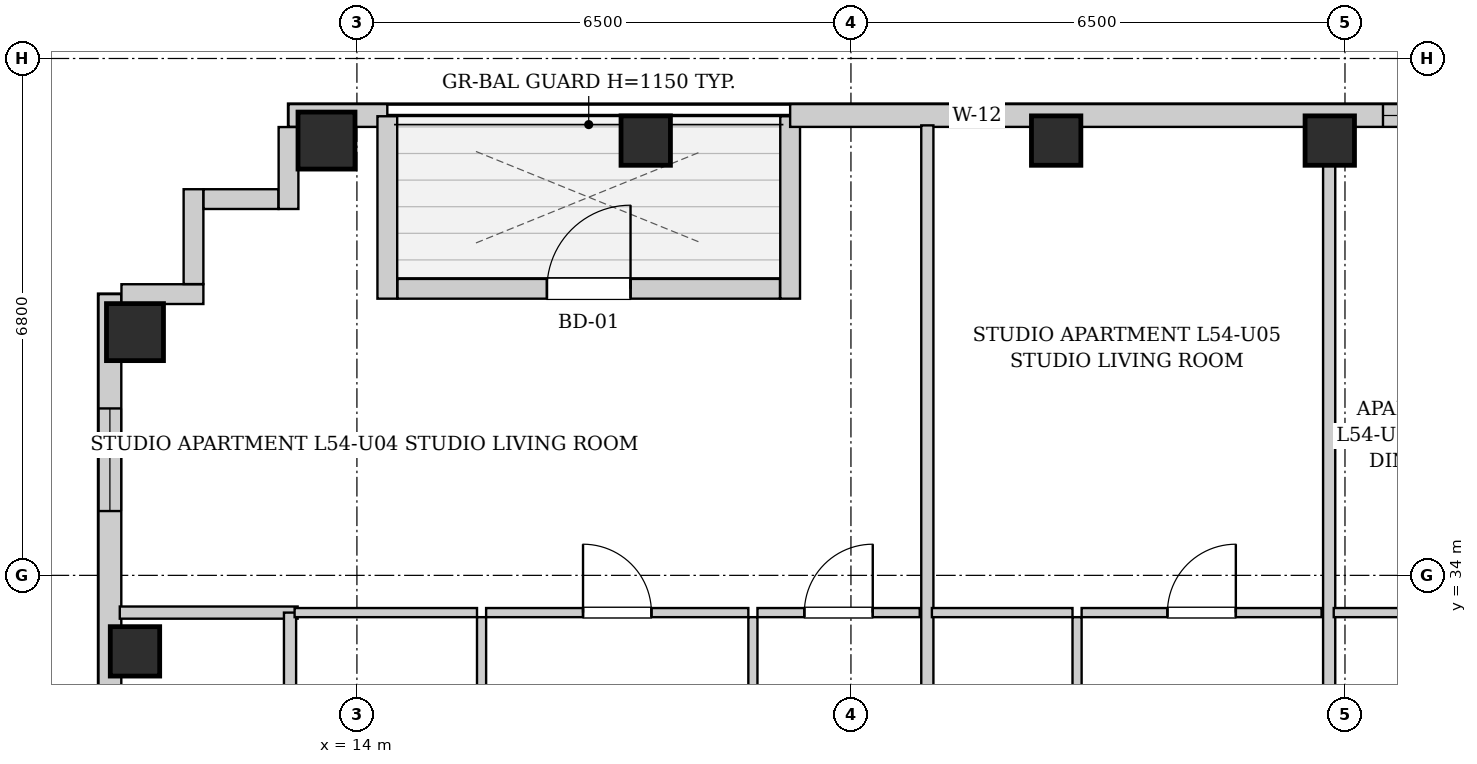
"""IFC4 building model, lengths in metres.
Left out: names, types, materials, properties, quantities, classifications, styles, units other than length and angle.
Written with IfcOpenShell. Run it as: python <this file> out.ifc"""

import sys

from ifc_helpers import new_model, si_unit, direction, frame, frame_2d, origin, origin_2d, place, context, subcontext, project, spatial, rectangle, extrude, element, fill, save


model = new_model("IFC4")
c1 = context("Model", 3, precision=1e-05, world=origin(), true_north=direction((0.0, 1.0)))
c2 = subcontext(c1, "Body", "Model", "MODEL_VIEW")
j1 = project(units=[si_unit("LENGTHUNIT", "METRE"), si_unit("PLANEANGLEUNIT", "RADIAN")], contexts=[c1])
p1 = place(None, origin())
s1 = spatial("IfcSite", under=j1, at=p1, CompositionType="ELEMENT")
p2 = place(p1, origin())
s2 = spatial("IfcBuilding", under=s1, at=p2, CompositionType="ELEMENT")
p3 = place(p2, frame((0.0, 0.0, 187.6)))
s3 = spatial("IfcBuildingStorey", under=s2, at=p3, CompositionType="ELEMENT", Elevation=187.6)
p4 = place(p3, frame((13.6, 39.72, 0.0), z_axis=(0.0, 0.0, 1.0), x_axis=(1.0, 0.0, 0.0)))
e1 = element("IfcColumn", 1, at=p4, inside=s3, PredefinedType="COLUMN", context=c2, shape_type="SweptSolid", body=[
    extrude(rectangle(XDim=0.75, YDim=0.75, at=origin_2d()), origin(), (0.0, 0.0, 1.0), 3.3),
])
for number, where, z_axis, x_axis in (
    (2, (17.8, 39.72, 0.0), (0.0, 0.0, 1.0), (1.0, 0.0, 0.0)),
    (3, (23.2, 39.72, 0.0), (0.0, 0.0, 1.0), (1.0, 0.0, 0.0)),
    (4, (26.8, 39.72, 0.0), (0.0, 0.0, 1.0), (1.0, 0.0, 0.0)),
    (5, (11.08, 33.0, 0.0), (0.0, 0.0, 1.0), (1.0, 0.0, 0.0)),
):
    element("IfcColumn", number, at=place(p3, frame(where, z_axis=z_axis, x_axis=x_axis)), inside=s3, PredefinedType="COLUMN", context=c2, shape_type="SweptSolid", body=[
        extrude(rectangle(XDim=0.65, YDim=0.65, at=origin_2d()), origin(), (0.0, 0.0, 1.0), 3.3),
    ])
p5 = place(p3, frame((11.08, 37.2, 0.0), z_axis=(0.0, 0.0, 1.0), x_axis=(1.0, 0.0, 0.0)))
e6 = element("IfcColumn", 6, at=p5, inside=s3, PredefinedType="COLUMN", context=c2, shape_type="SweptSolid", body=[
    extrude(rectangle(XDim=0.75, YDim=0.75, at=origin_2d()), origin(), (0.0, 0.0, 1.0), 3.3),
])
p6 = place(p3, frame((13.1, 40.05, 0.0), z_axis=(0.0, 0.0, 1.0), x_axis=(1.0, 0.0, 0.0)))
e7 = element("IfcWall", 7, at=p6, inside=s3, PredefinedType="SOLIDWALL", context=c2, shape_type="SweptSolid", body=[
    extrude(rectangle(XDim=1.3, YDim=0.3, at=frame_2d((0.65, 0.0))), origin(), (0.0, 0.0, 1.0), 3.04),
])
p7 = place(p3, frame((14.4, 40.04, 0.0), z_axis=(0.0, 0.0, 1.0), x_axis=(0.0, -1.0, 0.0)))
e8 = element("IfcWall", 8, at=p7, inside=s3, PredefinedType="SOLIDWALL", context=c2, shape_type="SweptSolid", body=[
    extrude(rectangle(XDim=2.4, YDim=0.26, at=frame_2d((1.2, 0.0))), origin(), (0.0, 0.0, 1.0), 3.04),
])
p8 = place(p3, frame((14.534, 37.77, 0.0), z_axis=(0.0, 0.0, 1.0), x_axis=(1.0, 0.0, 0.0)))
e9 = element("IfcWall", 9, at=p8, inside=s3, PredefinedType="SOLIDWALL", context=c2, shape_type="SweptSolid", body=[
    extrude(rectangle(XDim=5.032, YDim=0.26, at=frame_2d((2.516, 0.0))), origin(), (0.0, 0.0, 1.0), 3.04),
])
p9 = place(p8, frame((1.966, 0.0, 0.0)))
e10 = element("IfcOpeningElement", 10, at=p9, cuts=e9, PredefinedType="OPENING", context=c2, shape_type="SweptSolid", body=[
    extrude(rectangle(XDim=1.1, YDim=2.0, at=frame_2d((0.55, 1.0))), frame((0.0, 0.14, 0.0), z_axis=(0.0, -1.0, 0.0), x_axis=(1.0, 0.0, 0.0)), (0.0, 0.0, 1.0), 0.28),
])
p10 = place(p3, frame((19.7, 37.64, 0.0), z_axis=(0.0, 0.0, 1.0), x_axis=(0.0, 1.0, 0.0)))
e11 = element("IfcWall", 11, at=p10, inside=s3, PredefinedType="SOLIDWALL", context=c2, shape_type="SweptSolid", body=[
    extrude(rectangle(XDim=2.4, YDim=0.26, at=frame_2d((1.2, 0.0))), origin(), (0.0, 0.0, 1.0), 3.04),
])
p11 = place(p3, frame((19.7, 40.05, 0.0), z_axis=(0.0, 0.0, 1.0), x_axis=(1.0, 0.0, 0.0)))
e12 = element("IfcWall", 12, at=p11, inside=s3, PredefinedType="SOLIDWALL", context=c2, shape_type="SweptSolid", body=[
    extrude(rectangle(XDim=9.7, YDim=0.3, at=frame_2d((4.85, 0.0))), origin(), (0.0, 0.0, 1.0), 3.04),
])
p12 = place(p11, frame((2.12, 0.0, 0.55)))
e13 = element("IfcOpeningElement", 13, at=p12, cuts=e12, PredefinedType="OPENING", context=c2, shape_type="SweptSolid", body=[
    extrude(rectangle(XDim=0.68, YDim=1.2, at=frame_2d((0.34, 0.6))), frame((0.0, 0.16, 0.0), z_axis=(0.0, -1.0, 0.0), x_axis=(1.0, 0.0, 0.0)), (0.0, 0.0, 1.0), 0.32),
])
p13 = place(p11, frame((7.8, 0.0, 0.55)))
e14 = element("IfcOpeningElement", 14, at=p13, cuts=e12, PredefinedType="OPENING", context=c2, shape_type="SweptSolid", body=[
    extrude(rectangle(XDim=1.35, YDim=1.2, at=frame_2d((0.675, 0.6))), frame((0.0, 0.16, 0.0), z_axis=(0.0, -1.0, 0.0), x_axis=(1.0, 0.0, 0.0)), (0.0, 0.0, 1.0), 0.32),
])
p14 = place(p3, frame((10.75, 6.3, 0.0), z_axis=(0.0, 0.0, 1.0), x_axis=(0.0, 1.0, 0.0)))
e15 = element("IfcWall", 15, at=p14, inside=s3, PredefinedType="SOLIDWALL", context=c2, shape_type="SweptSolid", body=[
    extrude(rectangle(XDim=31.4, YDim=0.3, at=frame_2d((15.7, 0.0))), origin(), (0.0, 0.0, 1.0), 3.04),
])
p15 = place(p14, frame((1.504, 0.0, 0.55)))
e16 = element("IfcOpeningElement", 16, at=p15, cuts=e15, PredefinedType="OPENING", context=c2, shape_type="SweptSolid", body=[
    extrude(rectangle(XDim=1.35, YDim=1.2, at=frame_2d((0.675, 0.6))), frame((0.0, 0.16, 0.0), z_axis=(0.0, -1.0, 0.0), x_axis=(1.0, 0.0, 0.0)), (0.0, 0.0, 1.0), 0.32),
])
p16 = place(p14, frame((28.546, 0.0, 0.55)))
e17 = element("IfcOpeningElement", 17, at=p16, cuts=e15, PredefinedType="OPENING", context=c2, shape_type="SweptSolid", body=[
    extrude(rectangle(XDim=1.35, YDim=1.2, at=frame_2d((0.675, 0.6))), frame((0.0, 0.16, 0.0), z_axis=(0.0, -1.0, 0.0), x_axis=(1.0, 0.0, 0.0)), (0.0, 0.0, 1.0), 0.32),
])
p17 = place(p14, frame((11.85, 0.0, 0.55)))
e18 = element("IfcOpeningElement", 18, at=p17, cuts=e15, PredefinedType="OPENING", context=c2, shape_type="SweptSolid", body=[
    extrude(rectangle(XDim=1.35, YDim=1.2, at=frame_2d((0.675, 0.6))), frame((0.0, 0.16, 0.0), z_axis=(0.0, -1.0, 0.0), x_axis=(1.0, 0.0, 0.0)), (0.0, 0.0, 1.0), 0.32),
])
p18 = place(p14, frame((9.185, 0.0, 0.55)))
e19 = element("IfcOpeningElement", 19, at=p18, cuts=e15, PredefinedType="OPENING", context=c2, shape_type="SweptSolid", body=[
    extrude(rectangle(XDim=1.35, YDim=1.2, at=frame_2d((0.675, 0.6))), frame((0.0, 0.16, 0.0), z_axis=(0.0, -1.0, 0.0), x_axis=(1.0, 0.0, 0.0)), (0.0, 0.0, 1.0), 0.32),
])
p19 = place(p14, frame((19.006, 0.0, 0.55)))
e20 = element("IfcOpeningElement", 20, at=p19, cuts=e15, PredefinedType="OPENING", context=c2, shape_type="SweptSolid", body=[
    extrude(rectangle(XDim=1.35, YDim=1.2, at=frame_2d((0.675, 0.6))), frame((0.0, 0.16, 0.0), z_axis=(0.0, -1.0, 0.0), x_axis=(1.0, 0.0, 0.0)), (0.0, 0.0, 1.0), 0.32),
])
p20 = place(p14, frame((20.616, 0.0, 0.55)))
e21 = element("IfcOpeningElement", 21, at=p20, cuts=e15, PredefinedType="OPENING", context=c2, shape_type="SweptSolid", body=[
    extrude(rectangle(XDim=1.35, YDim=1.2, at=frame_2d((0.675, 0.6))), frame((0.0, 0.16, 0.0), z_axis=(0.0, -1.0, 0.0), x_axis=(1.0, 0.0, 0.0)), (0.0, 0.0, 1.0), 0.32),
])
p21 = place(p3, frame((10.902, 37.7, 0.0), z_axis=(0.0, 0.0, 1.0), x_axis=(1.0, 0.0, 0.0)))
e22 = element("IfcWall", 22, at=p21, inside=s3, PredefinedType="SOLIDWALL", context=c2, shape_type="SweptSolid", body=[
    extrude(rectangle(XDim=1.078, YDim=0.26, at=frame_2d((0.539, 0.0))), origin(), (0.0, 0.0, 1.0), 3.04),
])
p22 = place(p3, frame((11.85, 37.832, 0.0), z_axis=(0.0, 0.0, 1.0), x_axis=(0.0, 1.0, 0.0)))
e23 = element("IfcWall", 23, at=p22, inside=s3, PredefinedType="SOLIDWALL", context=c2, shape_type="SweptSolid", body=[
    extrude(rectangle(XDim=1.248, YDim=0.26, at=frame_2d((0.624, 0.0))), origin(), (0.0, 0.0, 1.0), 3.04),
])
p23 = place(p3, frame((11.982, 38.95, 0.0), z_axis=(0.0, 0.0, 1.0), x_axis=(1.0, 0.0, 0.0)))
e24 = element("IfcWall", 24, at=p23, inside=s3, PredefinedType="SOLIDWALL", context=c2, shape_type="SweptSolid", body=[
    extrude(rectangle(XDim=0.986, YDim=0.26, at=frame_2d((0.493, 0.0))), origin(), (0.0, 0.0, 1.0), 3.04),
])
p24 = place(p3, frame((13.1, 38.82, 0.0), z_axis=(0.0, 0.0, 1.0), x_axis=(0.0, 1.0, 0.0)))
e25 = element("IfcWall", 25, at=p24, inside=s3, PredefinedType="SOLIDWALL", context=c2, shape_type="SweptSolid", body=[
    extrude(rectangle(XDim=1.078, YDim=0.26, at=frame_2d((0.539, 0.0))), origin(), (0.0, 0.0, 1.0), 3.04),
])
p25 = place(p3, frame((10.88, 33.51, 0.0), z_axis=(0.0, 0.0, 1.0), x_axis=(1.0, 0.0, 0.0)))
e26 = element("IfcWall", 26, at=p25, inside=s3, PredefinedType="PARTITIONING", context=c2, shape_type="SweptSolid", body=[
    extrude(rectangle(XDim=2.34, YDim=0.16, at=frame_2d((1.17, 0.0))), origin(), (0.0, 0.0, 1.0), 3.04),
])
p26 = place(p3, frame((13.12, 30.6, 0.0), z_axis=(0.0, 0.0, 1.0), x_axis=(0.0, 1.0, 0.0)))
e27 = element("IfcWall", 27, at=p26, inside=s3, PredefinedType="PARTITIONING", context=c2, shape_type="SweptSolid", body=[
    extrude(rectangle(XDim=2.91, YDim=0.16, at=frame_2d((1.455, 0.0))), origin(), (0.0, 0.0, 1.0), 3.04),
])
p27 = place(p3, frame((15.64, 30.6, 0.0), z_axis=(0.0, 0.0, 1.0), x_axis=(0.0, 1.0, 0.0)))
e28 = element("IfcWall", 28, at=p27, inside=s3, PredefinedType="PARTITIONING", context=c2, shape_type="SweptSolid", body=[
    extrude(rectangle(XDim=2.85, YDim=0.12, at=frame_2d((1.425, 0.0))), origin(), (0.0, 0.0, 1.0), 3.04),
])
p28 = place(p27, frame((0.995, 0.0, 0.0)))
e29 = element("IfcOpeningElement", 29, at=p28, cuts=e28, PredefinedType="OPENING", context=c2, shape_type="SweptSolid", body=[
    extrude(rectangle(XDim=0.86, YDim=2.05, at=frame_2d((0.43, 1.025))), frame((0.0, 0.07, 0.0), z_axis=(0.0, -1.0, 0.0), x_axis=(1.0, 0.0, 0.0)), (0.0, 0.0, 1.0), 0.14),
])
p29 = place(p3, frame((13.18, 33.51, 0.0), z_axis=(0.0, 0.0, 1.0), x_axis=(1.0, 0.0, 0.0)))
e30 = element("IfcWall", 30, at=p29, inside=s3, PredefinedType="PARTITIONING", context=c2, shape_type="SweptSolid", body=[
    extrude(rectangle(XDim=2.4, YDim=0.12, at=frame_2d((1.2, 0.0))), origin(), (0.0, 0.0, 1.0), 3.04),
])
p30 = place(p3, frame((19.21, 30.6, 0.0), z_axis=(0.0, 0.0, 1.0), x_axis=(0.0, 1.0, 0.0)))
e31 = element("IfcWall", 31, at=p30, inside=s3, PredefinedType="PARTITIONING", context=c2, shape_type="SweptSolid", body=[
    extrude(rectangle(XDim=2.85, YDim=0.12, at=frame_2d((1.425, 0.0))), origin(), (0.0, 0.0, 1.0), 3.04),
])
p31 = place(p30, frame((0.975, 0.0, 0.0)))
e32 = element("IfcOpeningElement", 32, at=p31, cuts=e31, PredefinedType="OPENING", context=c2, shape_type="SweptSolid", body=[
    extrude(rectangle(XDim=0.9, YDim=2.05, at=frame_2d((0.45, 1.025))), frame((0.0, 0.07, 0.0), z_axis=(0.0, -1.0, 0.0), x_axis=(1.0, 0.0, 0.0)), (0.0, 0.0, 1.0), 0.14),
])
p32 = place(p3, frame((15.7, 33.51, 0.0), z_axis=(0.0, 0.0, 1.0), x_axis=(1.0, 0.0, 0.0)))
e33 = element("IfcWall", 33, at=p32, inside=s3, PredefinedType="PARTITIONING", context=c2, shape_type="SweptSolid", body=[
    extrude(rectangle(XDim=3.45, YDim=0.12, at=frame_2d((1.725, 0.0))), origin(), (0.0, 0.0, 1.0), 3.04),
])
p33 = place(p32, frame((1.275, 0.0, 0.0)))
e34 = element("IfcOpeningElement", 34, at=p33, cuts=e33, PredefinedType="OPENING", context=c2, shape_type="SweptSolid", body=[
    extrude(rectangle(XDim=0.9, YDim=2.05, at=frame_2d((0.45, 1.025))), frame((0.0, 0.07, 0.0), z_axis=(0.0, -1.0, 0.0), x_axis=(1.0, 0.0, 0.0)), (0.0, 0.0, 1.0), 0.14),
])
p34 = place(p3, frame((19.27, 33.51, 0.0), z_axis=(0.0, 0.0, 1.0), x_axis=(1.0, 0.0, 0.0)))
e35 = element("IfcWall", 35, at=p34, inside=s3, PredefinedType="PARTITIONING", context=c2, shape_type="SweptSolid", body=[
    extrude(rectangle(XDim=2.135, YDim=0.12, at=frame_2d((1.067, 0.0))), origin(), (0.0, 0.0, 1.0), 3.04),
])
p35 = place(p34, frame((0.617, 0.0, 0.0)))
e36 = element("IfcOpeningElement", 36, at=p35, cuts=e35, PredefinedType="OPENING", context=c2, shape_type="SweptSolid", body=[
    extrude(rectangle(XDim=0.9, YDim=2.05, at=frame_2d((0.45, 1.025))), frame((0.0, 0.07, 0.0), z_axis=(0.0, -1.0, 0.0), x_axis=(1.0, 0.0, 0.0)), (0.0, 0.0, 1.0), 0.14),
])
p36 = place(p3, frame((21.505, 30.6, 0.0), z_axis=(0.0, 0.0, 1.0), x_axis=(0.0, 1.0, 0.0)))
e37 = element("IfcWall", 37, at=p36, inside=s3, PredefinedType="PARTITIONING", context=c2, shape_type="SweptSolid", body=[
    extrude(rectangle(XDim=9.32, YDim=0.16, at=frame_2d((4.66, 0.0))), origin(), (0.0, 0.0, 1.0), 3.04),
])
p37 = place(p3, frame((23.475, 30.6, 0.0), z_axis=(0.0, 0.0, 1.0), x_axis=(0.0, 1.0, 0.0)))
e38 = element("IfcWall", 38, at=p37, inside=s3, PredefinedType="PARTITIONING", context=c2, shape_type="SweptSolid", body=[
    extrude(rectangle(XDim=2.85, YDim=0.12, at=frame_2d((1.425, 0.0))), origin(), (0.0, 0.0, 1.0), 3.04),
])
p38 = place(p37, frame((0.995, 0.0, 0.0)))
e39 = element("IfcOpeningElement", 39, at=p38, cuts=e38, PredefinedType="OPENING", context=c2, shape_type="SweptSolid", body=[
    extrude(rectangle(XDim=0.86, YDim=2.05, at=frame_2d((0.43, 1.025))), frame((0.0, 0.07, 0.0), z_axis=(0.0, -1.0, 0.0), x_axis=(1.0, 0.0, 0.0)), (0.0, 0.0, 1.0), 0.14),
])
p39 = place(p3, frame((21.565, 33.51, 0.0), z_axis=(0.0, 0.0, 1.0), x_axis=(1.0, 0.0, 0.0)))
e40 = element("IfcWall", 40, at=p39, inside=s3, PredefinedType="PARTITIONING", context=c2, shape_type="SweptSolid", body=[
    extrude(rectangle(XDim=1.85, YDim=0.12, at=frame_2d((0.925, 0.0))), origin(), (0.0, 0.0, 1.0), 3.04),
])
p40 = place(p3, frame((23.535, 33.51, 0.0), z_axis=(0.0, 0.0, 1.0), x_axis=(1.0, 0.0, 0.0)))
e41 = element("IfcWall", 41, at=p40, inside=s3, PredefinedType="PARTITIONING", context=c2, shape_type="SweptSolid", body=[
    extrude(rectangle(XDim=3.157, YDim=0.12, at=frame_2d((1.579, 0.0))), origin(), (0.0, 0.0, 1.0), 3.04),
])
p41 = place(p40, frame((1.129, 0.0, 0.0)))
e42 = element("IfcOpeningElement", 42, at=p41, cuts=e41, PredefinedType="OPENING", context=c2, shape_type="SweptSolid", body=[
    extrude(rectangle(XDim=0.9, YDim=2.05, at=frame_2d((0.45, 1.025))), frame((0.0, 0.07, 0.0), z_axis=(0.0, -1.0, 0.0), x_axis=(1.0, 0.0, 0.0)), (0.0, 0.0, 1.0), 0.14),
])
p42 = place(p3, frame((26.792, 30.6, 0.0), z_axis=(0.0, 0.0, 1.0), x_axis=(0.0, 1.0, 0.0)))
e43 = element("IfcWall", 43, at=p42, inside=s3, PredefinedType="PARTITIONING", context=c2, shape_type="SweptSolid", body=[
    extrude(rectangle(XDim=9.32, YDim=0.16, at=frame_2d((4.66, 0.0))), origin(), (0.0, 0.0, 1.0), 3.04),
])
p43 = place(p3, frame((26.852, 33.51, 0.0), z_axis=(0.0, 0.0, 1.0), x_axis=(1.0, 0.0, 0.0)))
e44 = element("IfcWall", 44, at=p43, inside=s3, PredefinedType="PARTITIONING", context=c2, shape_type="SweptSolid", body=[
    extrude(rectangle(XDim=2.4, YDim=0.12, at=frame_2d((1.2, 0.0))), origin(), (0.0, 0.0, 1.0), 3.04),
])
p44 = place(p33, origin())
e45 = element("IfcDoor", 45, at=p44, inside=s3, OperationType="SINGLE_SWING_LEFT", PredefinedType="DOOR", context=c2, shape_type="SweptSolid", body=[
    extrude(rectangle(XDim=0.9, YDim=2.05, at=frame_2d((0.45, 1.025))), frame((0.0, 0.025, 0.0), z_axis=(0.0, -1.0, 0.0), x_axis=(1.0, 0.0, 0.0)), (0.0, 0.0, 1.0), 0.05),
])
fill(e34, e45)
p45 = place(p35, origin())
e46 = element("IfcDoor", 46, at=p45, inside=s3, OperationType="SINGLE_SWING_RIGHT", PredefinedType="DOOR", context=c2, shape_type="SweptSolid", body=[
    extrude(rectangle(XDim=0.9, YDim=2.05, at=frame_2d((0.45, 1.025))), frame((0.0, 0.025, 0.0), z_axis=(0.0, -1.0, 0.0), x_axis=(1.0, 0.0, 0.0)), (0.0, 0.0, 1.0), 0.05),
])
fill(e36, e46)
p46 = place(p41, origin())
e47 = element("IfcDoor", 47, at=p46, inside=s3, OperationType="SINGLE_SWING_RIGHT", PredefinedType="DOOR", context=c2, shape_type="SweptSolid", body=[
    extrude(rectangle(XDim=0.9, YDim=2.05, at=frame_2d((0.45, 1.025))), frame((0.0, 0.025, 0.0), z_axis=(0.0, -1.0, 0.0), x_axis=(1.0, 0.0, 0.0)), (0.0, 0.0, 1.0), 0.05),
])
fill(e42, e47)
p47 = place(p9, origin())
e48 = element("IfcDoor", 48, at=p47, inside=s3, OperationType="SINGLE_SWING_RIGHT", PredefinedType="DOOR", context=c2, shape_type="SweptSolid", body=[
    extrude(rectangle(XDim=1.1, YDim=2.0, at=frame_2d((0.55, 1.0))), frame((0.0, 0.025, 0.0), z_axis=(0.0, -1.0, 0.0), x_axis=(1.0, 0.0, 0.0)), (0.0, 0.0, 1.0), 0.05),
])
fill(e10, e48)
p48 = place(p16, origin())
e49 = element("IfcWindow", 49, at=p48, inside=s3, PartitioningType="SINGLE_PANEL", PredefinedType="WINDOW", context=c2, shape_type="SweptSolid", body=[
    extrude(rectangle(XDim=1.35, YDim=1.2, at=frame_2d((0.675, 0.6))), frame((0.0, 0.03, 0.0), z_axis=(0.0, -1.0, 0.0), x_axis=(1.0, 0.0, 0.0)), (0.0, 0.0, 1.0), 0.06),
])
fill(e17, e49)
p49 = place(p12, origin())
e50 = element("IfcWindow", 50, at=p49, inside=s3, PartitioningType="SINGLE_PANEL", PredefinedType="WINDOW", context=c2, shape_type="SweptSolid", body=[
    extrude(rectangle(XDim=0.68, YDim=1.2, at=frame_2d((0.34, 0.6))), frame((0.0, 0.03, 0.0), z_axis=(0.0, -1.0, 0.0), x_axis=(1.0, 0.0, 0.0)), (0.0, 0.0, 1.0), 0.06),
])
fill(e13, e50)
p50 = place(p13, origin())
e51 = element("IfcWindow", 51, at=p50, inside=s3, PartitioningType="SINGLE_PANEL", PredefinedType="WINDOW", context=c2, shape_type="SweptSolid", body=[
    extrude(rectangle(XDim=1.35, YDim=1.2, at=frame_2d((0.675, 0.6))), frame((0.0, 0.03, 0.0), z_axis=(0.0, -1.0, 0.0), x_axis=(1.0, 0.0, 0.0)), (0.0, 0.0, 1.0), 0.06),
])
fill(e14, e51)
save(model, sys.argv[1])
